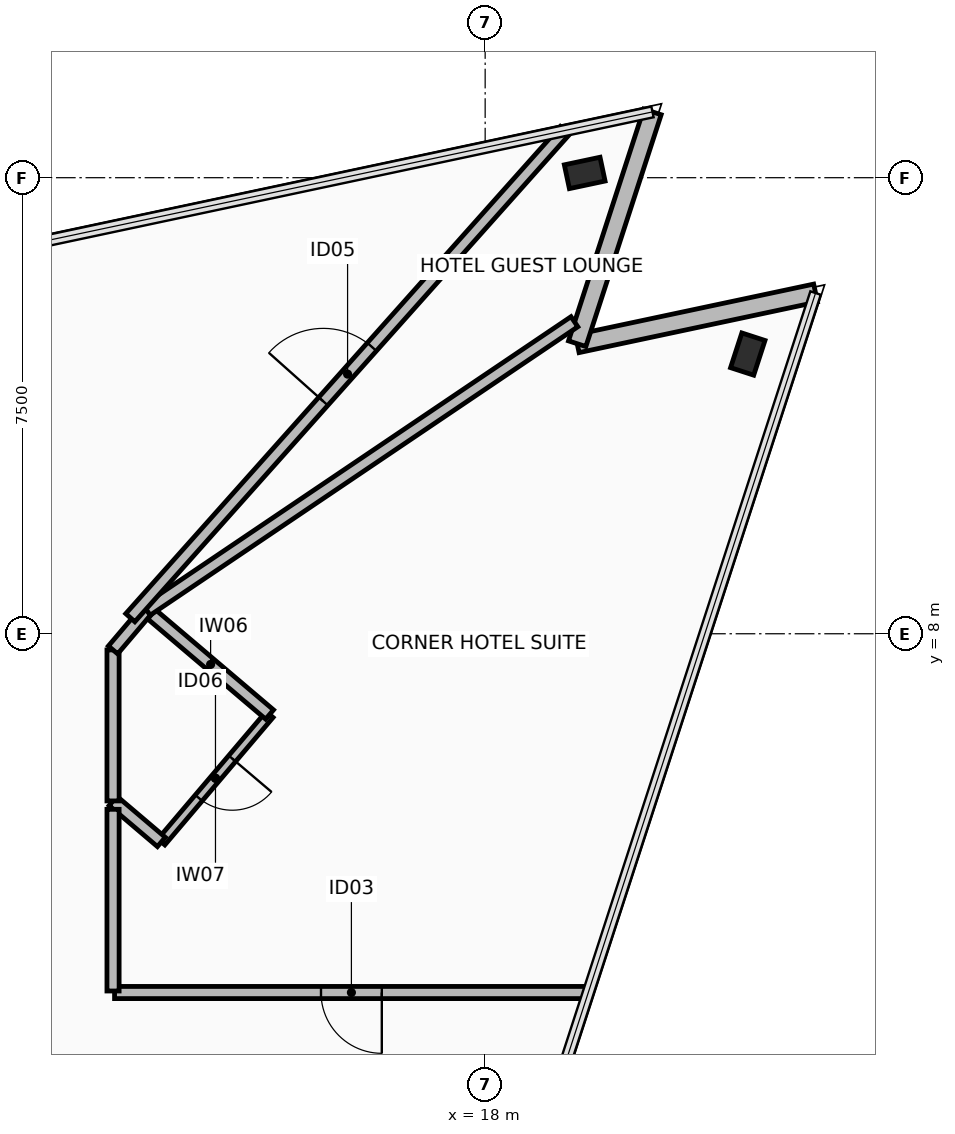
"""IFC4 building model, lengths in metres.
Left out: names, types, materials, properties, quantities, classifications, styles, units other than length and angle.
Written with IfcOpenShell. Run it as: python <this file> out.ifc"""

import sys

from ifc_helpers import new_model, si_unit, direction, frame, frame_2d, origin, origin_2d, place, context, subcontext, project, spatial, rectangle, hollow_rectangle, extrude, element, fill, save


model = new_model("IFC4")
c1 = context("Model", 3, precision=1e-05, world=origin(), true_north=direction((0.0, 1.0)))
c2 = subcontext(c1, "Body", "Model", "MODEL_VIEW")
j1 = project(units=[si_unit("LENGTHUNIT", "METRE"), si_unit("PLANEANGLEUNIT", "RADIAN")], contexts=[c1])
p1 = place(None, origin())
s1 = spatial("IfcSite", under=j1, at=p1, CompositionType="ELEMENT")
p2 = place(p1, origin())
s2 = spatial("IfcBuilding", under=s1, at=p2, CompositionType="ELEMENT")
p3 = place(p2, frame((0.0, 0.0, 279.75)))
s3 = spatial("IfcBuildingStorey", under=s2, at=p3, CompositionType="ELEMENT", Elevation=279.75)
for number, where, z_axis, x_axis in (
    (1, (22.319, 12.6, 0.0), (0.0, 0.0, 1.0), (0.309, 0.951, 0.0)),
    (2, (19.637, 15.578, 0.0), (0.0, 0.0, 1.0), (0.978, 0.208, 0.0)),
):
    element("IfcColumn", number, at=place(p3, frame(where, z_axis=z_axis, x_axis=x_axis)), inside=s3, PredefinedType="COLUMN", context=c2, shape_type="SweptSolid", body=[
        extrude(hollow_rectangle(XDim=0.4, YDim=0.6, WallThickness=0.03, at=origin_2d()), origin(), (0.0, 0.0, 1.0), 3.65),
    ])
p4 = place(p3, frame((23.434, 13.603, 0.0), z_axis=(0.0, 0.0, 1.0), x_axis=(-0.97815049033, -0.207898095871, 0.0)))
e3 = element("IfcWall", 3, at=p4, inside=s3, PredefinedType="STANDARD", context=c2, shape_type="SweptSolid", body=[
    extrude(rectangle(XDim=4.008, YDim=0.3, at=frame_2d((2.004, 0.0))), origin(), (0.0, 0.0, 1.0), 2.81),
])
p5 = place(p3, frame((19.513, 12.77, 0.0), z_axis=(0.0, 0.0, 1.0), x_axis=(0.309018580232, 0.951056001018, 0.0)))
e4 = element("IfcWall", 4, at=p5, inside=s3, PredefinedType="STANDARD", context=c2, shape_type="SweptSolid", body=[
    extrude(rectangle(XDim=4.008, YDim=0.3, at=frame_2d((2.004, 0.0))), origin(), (0.0, 0.0, 1.0), 2.81),
])
p6 = place(p3, frame((14.455, 6.672, 0.0), z_axis=(0.0, 0.0, 1.0), x_axis=(-0.647230821936, -0.762294079169, 0.0)))
e5 = element("IfcWall", 5, at=p6, inside=s3, PredefinedType="PARTITIONING", context=c2, shape_type="SweptSolid", body=[
    extrude(rectangle(XDim=2.75, YDim=0.15, at=frame_2d((1.375, 0.0))), origin(), (0.0, 0.0, 1.0), 3.465),
])
p7 = place(p6, frame((0.95, 0.0, 0.0)))
e6 = element("IfcOpeningElement", 6, at=p7, cuts=e5, PredefinedType="OPENING", context=c2, shape_type="SweptSolid", body=[
    extrude(rectangle(XDim=0.85, YDim=2.1, at=frame_2d((0.425, 1.05))), frame((0.0, 0.085, 0.0), z_axis=(0.0, -1.0, 0.0), x_axis=(1.0, 0.0, 0.0)), (0.0, 0.0, 1.0), 0.17),
])
p8 = place(p3, frame((12.675, 4.576, 0.0), z_axis=(0.0, 0.0, 1.0), x_axis=(-0.762355104859, 0.647158940366, 0.0)))
e7 = element("IfcWall", 7, at=p8, inside=s3, PredefinedType="PARTITIONING", context=c2, shape_type="SweptSolid", body=[
    extrude(rectangle(XDim=1.043, YDim=0.2, at=frame_2d((0.521, 0.0))), origin(), (0.0, 0.0, 1.0), 3.465),
])
p9 = place(p3, frame((11.88, 5.251, 0.0), z_axis=(0.0, 0.0, 1.0), x_axis=(0.0, 1.0, 0.0)))
e8 = element("IfcWall", 8, at=p9, inside=s3, PredefinedType="PARTITIONING", context=c2, shape_type="SweptSolid", body=[
    extrude(rectangle(XDim=2.483, YDim=0.2, at=frame_2d((1.242, 0.0))), origin(), (0.0, 0.0, 1.0), 3.465),
])
p10 = place(p3, frame((11.88, 7.734, 0.0), z_axis=(0.0, 0.0, 1.0), x_axis=(0.647383821679, 0.7621641473, 0.0)))
e9 = element("IfcWall", 9, at=p10, inside=s3, PredefinedType="PARTITIONING", context=c2, shape_type="SweptSolid", body=[
    extrude(rectangle(XDim=0.857, YDim=0.2, at=frame_2d((0.429, 0.0))), origin(), (0.0, 0.0, 1.0), 3.465),
])
p11 = place(p3, frame((12.515, 8.319, 0.0), z_axis=(0.0, 0.0, 1.0), x_axis=(0.762275325084, -0.647252909432, 0.0)))
e10 = element("IfcWall", 10, at=p11, inside=s3, PredefinedType="PARTITIONING", context=c2, shape_type="SweptSolid", body=[
    extrude(rectangle(XDim=2.545, YDim=0.2, at=frame_2d((1.272, 0.0))), origin(), (0.0, 0.0, 1.0), 3.465),
])
p12 = place(p3, frame((19.696, 2.1, 0.0), z_axis=(0.0, 0.0, 1.0), x_axis=(-1.0, 0.0, 0.0)))
e11 = element("IfcWall", 11, at=p12, inside=s3, PredefinedType="PARTITIONING", context=c2, shape_type="SweptSolid", body=[
    extrude(rectangle(XDim=7.791, YDim=0.2, at=frame_2d((3.896, 0.0))), origin(), (0.0, 0.0, 1.0), 2.81),
])
p13 = place(p12, frame((3.396, 0.0, 0.0)))
e12 = element("IfcOpeningElement", 12, at=p13, cuts=e11, PredefinedType="OPENING", context=c2, shape_type="SweptSolid", body=[
    extrude(rectangle(XDim=1.0, YDim=2.15, at=frame_2d((0.5, 1.075))), frame((0.0, 0.11, 0.0), z_axis=(0.0, -1.0, 0.0), x_axis=(1.0, 0.0, 0.0)), (0.0, 0.0, 1.0), 0.22),
])
p14 = place(p3, frame((11.88, 2.125, 0.0), z_axis=(0.0, 0.0, 1.0), x_axis=(0.0, 1.0, 0.0)))
e13 = element("IfcWall", 13, at=p14, inside=s3, PredefinedType="PARTITIONING", context=c2, shape_type="SweptSolid", body=[
    extrude(rectangle(XDim=2.988, YDim=0.2, at=frame_2d((1.494, 0.0))), origin(), (0.0, 0.0, 1.0), 3.465),
])
p15 = place(p3, frame((12.435, 8.387, 0.0), z_axis=(0.0, 0.0, 1.0), x_axis=(0.82904079251, 0.559188129661, 0.0)))
e14 = element("IfcWall", 14, at=p15, inside=s3, PredefinedType="PARTITIONING", context=c2, shape_type="SweptSolid", body=[
    extrude(rectangle(XDim=8.484, YDim=0.2, at=frame_2d((4.242, 0.0))), origin(), (0.0, 0.0, 1.0), 2.96),
])
p16 = place(p3, frame((12.164, 8.264, 0.0), z_axis=(0.0, 0.0, 1.0), x_axis=(0.665683993265, 0.746233757686, 0.0)))
e15 = element("IfcWall", 15, at=p16, inside=s3, PredefinedType="PARTITIONING", context=c2, shape_type="SweptSolid", body=[
    extrude(rectangle(XDim=10.736, YDim=0.2, at=frame_2d((5.368, 0.0))), origin(), (0.0, 0.0, 1.0), 2.81),
])
p17 = place(p16, frame((4.768, 0.0, 0.0)))
e16 = element("IfcOpeningElement", 16, at=p17, cuts=e15, PredefinedType="OPENING", context=c2, shape_type="SweptSolid", body=[
    extrude(rectangle(XDim=1.2, YDim=2.15, at=frame_2d((0.6, 1.075))), frame((0.0, 0.11, 0.0), z_axis=(0.0, -1.0, 0.0), x_axis=(1.0, 0.0, 0.0)), (0.0, 0.0, 1.0), 0.22),
])
p18 = place(p7, origin())
e17 = element("IfcDoor", 17, at=p18, inside=s3, OperationType="SINGLE_SWING_RIGHT", PredefinedType="DOOR", context=c2, shape_type="SweptSolid", body=[
    extrude(rectangle(XDim=0.85, YDim=2.1, at=frame_2d((0.425, 1.05))), frame((0.0, 0.025, 0.0), z_axis=(0.0, -1.0, 0.0), x_axis=(1.0, 0.0, 0.0)), (0.0, 0.0, 1.0), 0.05),
])
fill(e6, e17)
p19 = place(p13, origin())
e18 = element("IfcDoor", 18, at=p19, inside=s3, OperationType="SINGLE_SWING_LEFT", PredefinedType="DOOR", context=c2, shape_type="SweptSolid", body=[
    extrude(rectangle(XDim=1.0, YDim=2.15, at=frame_2d((0.5, 1.075))), frame((0.0, 0.025, 0.0), z_axis=(0.0, -1.0, 0.0), x_axis=(1.0, 0.0, 0.0)), (0.0, 0.0, 1.0), 0.05),
])
fill(e12, e18)
p20 = place(p17, origin())
e19 = element("IfcDoor", 19, at=p20, inside=s3, OperationType="SINGLE_SWING_LEFT", PredefinedType="DOOR", context=c2, shape_type="SweptSolid", body=[
    extrude(rectangle(XDim=1.2, YDim=2.15, at=frame_2d((0.6, 1.075))), frame((0.0, 0.025, 0.0), z_axis=(0.0, -1.0, 0.0), x_axis=(1.0, 0.0, 0.0)), (0.0, 0.0, 1.0), 0.05),
])
fill(e16, e19)
save(model, sys.argv[1])
